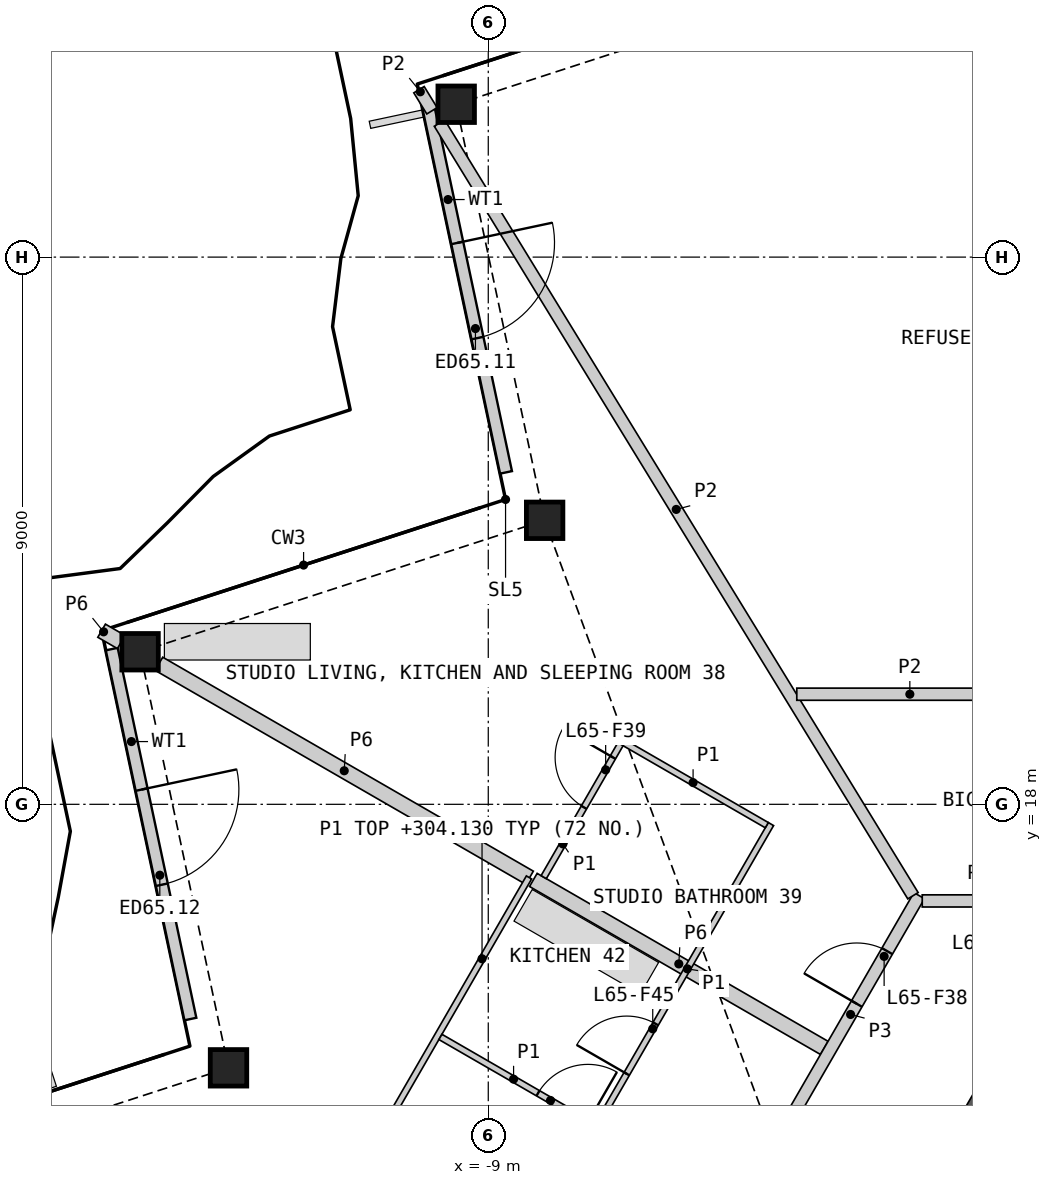
"""IFC4 building model, lengths in metres.
Left out: names, types, materials, properties, quantities, classifications, styles, units other than length and angle.
Written with IfcOpenShell. Run it as: python <this file> out.ifc"""

import sys

from ifc_helpers import new_model, si_unit, direction, frame, frame_2d, origin, origin_2d, place, context, subcontext, project, spatial, rectangle, hollow_rectangle, extrude, element, fill, save


model = new_model("IFC4")
c1 = context("Model", 3, precision=1e-05, world=origin(), true_north=direction((0.0, 1.0)))
c2 = subcontext(c1, "Body", "Model", "MODEL_VIEW")
j1 = project(units=[si_unit("LENGTHUNIT", "METRE"), si_unit("PLANEANGLEUNIT", "RADIAN")], contexts=[c1])
p1 = place(None, origin())
s1 = spatial("IfcSite", under=j1, at=p1, CompositionType="ELEMENT")
p2 = place(p1, origin())
s2 = spatial("IfcBuilding", under=s1, at=p2, CompositionType="ELEMENT")
p3 = place(p2, frame((0.0, 0.0, 301.8)))
s3 = spatial("IfcBuildingStorey", under=s2, at=p3, CompositionType="ELEMENT", Elevation=301.8)
for number, where, z_axis, x_axis in (
    (1, (-9.527, 29.514, 0.0), (0.0, 0.0, 1.0), (1.0, 0.0, 0.0)),
    (2, (-8.073, 22.671, 0.0), (0.0, 0.0, 1.0), (1.0, 0.0, 0.0)),
    (3, (-14.727, 20.509, 0.0), (0.0, 0.0, 1.0), (1.0, 0.0, 0.0)),
    (4, (-13.272, 13.666, 0.0), (0.0, 0.0, 1.0), (1.0, 0.0, 0.0)),
):
    element("IfcColumn", number, at=place(p3, frame(where, z_axis=z_axis, x_axis=x_axis)), inside=s3, PredefinedType="COLUMN", context=c2, shape_type="SweptSolid", body=[
        extrude(hollow_rectangle(XDim=0.6, YDim=0.6, WallThickness=0.04, at=origin_2d()), origin(), (0.0, 0.0, 1.0), 3.4),
    ])
p4 = place(p3, frame((-9.98, 29.443, 0.0), z_axis=(0.0, 0.0, 1.0), x_axis=(0.20793703803, -0.978142212674, 0.0)))
e5 = element("IfcWall", 5, at=p4, inside=s3, PredefinedType="SOLIDWALL", context=c2, shape_type="SweptSolid", body=[
    extrude(rectangle(XDim=6.117, YDim=0.2, at=frame_2d((3.059, 0.0))), origin(), (0.0, 0.0, 1.0), 2.488),
])
p5 = place(p4, frame((2.259, 0.0, 0.0)))
e6 = element("IfcOpeningElement", 6, at=p5, cuts=e5, PredefinedType="OPENING", context=c2, shape_type="SweptSolid", body=[
    extrude(rectangle(XDim=1.6, YDim=2.25, at=frame_2d((0.8, 1.125))), frame((0.0, 0.11, 0.0), z_axis=(0.0, -1.0, 0.0), x_axis=(1.0, 0.0, 0.0)), (0.0, 0.0, 1.0), 0.22),
])
p6 = place(p3, frame((-15.192, 20.553, 0.0), z_axis=(0.0, 0.0, 1.0), x_axis=(0.207920712138, -0.97814568315, 0.0)))
e7 = element("IfcWall", 7, at=p6, inside=s3, PredefinedType="SOLIDWALL", context=c2, shape_type="SweptSolid", body=[
    extrude(rectangle(XDim=6.221, YDim=0.2, at=frame_2d((3.11, 0.0))), origin(), (0.0, 0.0, 1.0), 2.488),
])
p7 = place(p6, frame((2.362, 0.0, 0.0)))
e8 = element("IfcOpeningElement", 8, at=p7, cuts=e7, PredefinedType="OPENING", context=c2, shape_type="SweptSolid", body=[
    extrude(rectangle(XDim=1.6, YDim=2.25, at=frame_2d((0.8, 1.125))), frame((0.0, 0.11, 0.0), z_axis=(0.0, -1.0, 0.0), x_axis=(1.0, 0.0, 0.0)), (0.0, 0.0, 1.0), 0.22),
])
p8 = place(p3, frame((-0.26, 13.961, 0.0), z_axis=(0.0, 0.0, 1.0), x_axis=(-0.499980485389, -0.866036670257, 0.0)))
e9 = element("IfcWall", 9, at=p8, inside=s3, PredefinedType="SHEAR", context=c2, shape_type="SweptSolid", body=[
    extrude(rectangle(XDim=4.559, YDim=0.6, at=frame_2d((2.28, 0.0))), origin(), (0.0, 0.0, 1.0), 3.1),
])
p9 = place(p3, frame((-14.417, 20.311, 0.0), z_axis=(0.0, 0.0, 1.0), x_axis=(0.866027308682, -0.499996700606, 0.0)))
e10 = element("IfcWall", 10, at=p9, inside=s3, PredefinedType="PARTITIONING", context=c2, shape_type="SweptSolid", body=[
    extrude(rectangle(XDim=7.038, YDim=0.25, at=frame_2d((3.519, 0.0))), origin(), (0.0, 0.0, 1.0), 2.33),
])
p10 = place(p3, frame((-8.259, 16.756, 0.0), z_axis=(0.0, 0.0, 1.0), x_axis=(0.866023692682, -0.500002963705, 0.0)))
e11 = element("IfcWall", 11, at=p10, inside=s3, PredefinedType="PARTITIONING", context=c2, shape_type="SweptSolid", body=[
    extrude(rectangle(XDim=5.525, YDim=0.25, at=frame_2d((2.762, 0.0))), origin(), (0.0, 0.0, 1.0), 2.33),
])
p11 = place(p3, frame((-4.169, 12.59, 0.0), z_axis=(0.0, 0.0, 1.0), x_axis=(0.499950370306, 0.866054055606, 0.0)))
e12 = element("IfcWall", 12, at=p11, inside=s3, PredefinedType="PARTITIONING", context=c2, shape_type="SweptSolid", body=[
    extrude(rectangle(XDim=4.513, YDim=0.2, at=frame_2d((2.256, 0.0))), origin(), (0.0, 0.0, 1.0), 3.1),
])
p12 = place(p11, frame((2.459, 0.0, 0.0)))
e13 = element("IfcOpeningElement", 13, at=p12, cuts=e12, PredefinedType="OPENING", context=c2, shape_type="SweptSolid", body=[
    extrude(rectangle(XDim=1.0, YDim=2.1, at=frame_2d((0.5, 1.05))), frame((0.0, 0.11, 0.0), z_axis=(0.0, -1.0, 0.0), x_axis=(1.0, 0.0, 0.0)), (0.0, 0.0, 1.0), 0.22),
])
p13 = place(p3, frame((-1.863, 16.411, 0.0), z_axis=(0.0, 0.0, 1.0), x_axis=(1.0, 0.0, 0.0)))
e14 = element("IfcWall", 14, at=p13, inside=s3, PredefinedType="PARTITIONING", context=c2, shape_type="SweptSolid", body=[
    extrude(rectangle(XDim=3.726, YDim=0.2, at=frame_2d((1.863, 0.0))), origin(), (0.0, 0.0, 1.0), 3.1),
])
p14 = place(p13, frame((1.388, 0.0, 0.0)))
e15 = element("IfcOpeningElement", 15, at=p14, cuts=e14, PredefinedType="OPENING", context=c2, shape_type="SweptSolid", body=[
    extrude(rectangle(XDim=0.95, YDim=2.1, at=frame_2d((0.475, 1.05))), frame((0.0, 0.11, 0.0), z_axis=(0.0, -1.0, 0.0), x_axis=(1.0, 0.0, 0.0)), (0.0, 0.0, 1.0), 0.22),
])
p15 = place(p3, frame((-15.359, 20.855, 0.0), z_axis=(0.0, 0.0, 1.0), x_axis=(0.865770353626, -0.500441499861, 0.0)))
e16 = element("IfcWall", 16, at=p15, inside=s3, PredefinedType="PARTITIONING", context=c2, shape_type="SweptSolid", body=[
    extrude(rectangle(XDim=0.372, YDim=0.25, at=frame_2d((0.186, 0.0))), origin(), (0.0, 0.0, 1.0), 2.33),
])
p16 = place(p3, frame((-9.802, 29.204, 0.0), z_axis=(0.0, 0.0, 1.0), x_axis=(0.522487920222, -0.852646687217, 0.0)))
e17 = element("IfcWall", 17, at=p16, inside=s3, PredefinedType="PARTITIONING", context=c2, shape_type="SweptSolid", body=[
    extrude(rectangle(XDim=14.904, YDim=0.2, at=frame_2d((7.452, 0.0))), origin(), (0.0, 0.0, 1.0), 2.33),
])
p17 = place(p3, frame((-3.926, 19.811, 0.0), z_axis=(0.0, 0.0, 1.0), x_axis=(1.0, 0.0, 0.0)))
e18 = element("IfcWall", 18, at=p17, inside=s3, PredefinedType="PARTITIONING", context=c2, shape_type="SweptSolid", body=[
    extrude(rectangle(XDim=3.718, YDim=0.2, at=frame_2d((1.859, 0.0))), origin(), (0.0, 0.0, 1.0), 2.33),
])
p18 = place(p3, frame((-10.139, 29.754, 0.0), z_axis=(0.0, 0.0, 1.0), x_axis=(0.522224976177, -0.852807759262, 0.0)))
e19 = element("IfcWall", 19, at=p18, inside=s3, PredefinedType="PARTITIONING", context=c2, shape_type="SweptSolid", body=[
    extrude(rectangle(XDim=0.408, YDim=0.2, at=frame_2d((0.204, 0.0))), origin(), (0.0, 0.0, 1.0), 2.33),
])
p19 = place(p3, frame((-16.054, 3.419, 0.0), z_axis=(0.0, 0.0, 1.0), x_axis=(0.499999256795, 0.866025832873, 0.0)))
e20 = element("IfcWall", 20, at=p19, inside=s3, PredefinedType="PARTITIONING", context=c2, shape_type="SweptSolid", body=[
    extrude(rectangle(XDim=15.448, YDim=0.1, at=frame_2d((7.724, 0.0))), origin(), (0.0, 0.0, 1.0), 2.33),
])
p20 = place(p19, frame((8.306, 0.0, 0.0)))
e21 = element("IfcOpeningElement", 21, at=p20, cuts=e20, PredefinedType="OPENING", context=c2, shape_type="SweptSolid", body=[
    extrude(rectangle(XDim=0.95, YDim=2.1, at=frame_2d((0.475, 1.05))), frame((0.0, 0.06, 0.0), z_axis=(0.0, -1.0, 0.0), x_axis=(1.0, 0.0, 0.0)), (0.0, 0.0, 1.0), 0.12),
])
p21 = place(p19, frame((1.76, 0.0, 0.0)))
e22 = element("IfcOpeningElement", 22, at=p21, cuts=e20, PredefinedType="OPENING", context=c2, shape_type="SweptSolid", body=[
    extrude(rectangle(XDim=0.95, YDim=2.1, at=frame_2d((0.475, 1.05))), frame((0.0, 0.06, 0.0), z_axis=(0.0, -1.0, 0.0), x_axis=(1.0, 0.0, 0.0)), (0.0, 0.0, 1.0), 0.12),
])
p22 = place(p3, frame((-9.787, 14.174, 0.0), z_axis=(0.0, 0.0, 1.0), x_axis=(0.866031222068, -0.499989922303, 0.0)))
e23 = element("IfcWall", 23, at=p22, inside=s3, PredefinedType="PARTITIONING", context=c2, shape_type="SweptSolid", body=[
    extrude(rectangle(XDim=5.557, YDim=0.1, at=frame_2d((2.779, 0.0))), origin(), (0.0, 0.0, 1.0), 2.33),
])
p23 = place(p22, frame((1.853, 0.0, 0.0)))
e24 = element("IfcOpeningElement", 24, at=p23, cuts=e23, PredefinedType="OPENING", context=c2, shape_type="SweptSolid", body=[
    extrude(rectangle(XDim=0.95, YDim=2.1, at=frame_2d((0.475, 1.05))), frame((0.0, 0.06, 0.0), z_axis=(0.0, -1.0, 0.0), x_axis=(1.0, 0.0, 0.0)), (0.0, 0.0, 1.0), 0.12),
])
p24 = place(p3, frame((-7.101, 12.912, 0.0), z_axis=(0.0, 0.0, 1.0), x_axis=(0.499996545922, 0.866027397988, 0.0)))
e25 = element("IfcWall", 25, at=p24, inside=s3, PredefinedType="PARTITIONING", context=c2, shape_type="SweptSolid", body=[
    extrude(rectangle(XDim=5.5, YDim=0.1, at=frame_2d((2.75, 0.0))), origin(), (0.0, 0.0, 1.0), 2.33),
])
p25 = place(p24, frame((0.756, 0.0, 0.0)))
e26 = element("IfcOpeningElement", 26, at=p25, cuts=e25, PredefinedType="OPENING", context=c2, shape_type="SweptSolid", body=[
    extrude(rectangle(XDim=0.95, YDim=2.1, at=frame_2d((0.475, 1.05))), frame((0.0, 0.06, 0.0), z_axis=(0.0, -1.0, 0.0), x_axis=(1.0, 0.0, 0.0)), (0.0, 0.0, 1.0), 0.12),
])
p26 = place(p3, frame((-6.844, 19.057, 0.0), z_axis=(0.0, 0.0, 1.0), x_axis=(0.866034573852, -0.49998411664, 0.0)))
e27 = element("IfcWall", 27, at=p26, inside=s3, PredefinedType="PARTITIONING", context=c2, shape_type="SweptSolid", body=[
    extrude(rectangle(XDim=2.8, YDim=0.1, at=frame_2d((1.4, 0.0))), origin(), (0.0, 0.0, 1.0), 2.33),
])
p27 = place(p3, frame((-8.088, 16.802, 0.0), z_axis=(0.0, 0.0, 1.0), x_axis=(0.499976333282, 0.866039067339, 0.0)))
e28 = element("IfcWall", 28, at=p27, inside=s3, PredefinedType="PARTITIONING", context=c2, shape_type="SweptSolid", body=[
    extrude(rectangle(XDim=2.525, YDim=0.1, at=frame_2d((1.262, 0.0))), origin(), (0.0, 0.0, 1.0), 2.33),
])
p28 = place(p27, frame((1.325, 0.0, 0.0)))
e29 = element("IfcOpeningElement", 29, at=p28, cuts=e28, PredefinedType="OPENING", context=c2, shape_type="SweptSolid", body=[
    extrude(rectangle(XDim=0.95, YDim=2.1, at=frame_2d((0.475, 1.05))), frame((0.0, 0.06, 0.0), z_axis=(0.0, -1.0, 0.0), x_axis=(1.0, 0.0, 0.0)), (0.0, 0.0, 1.0), 0.12),
])
p29 = place(p5, origin())
e30 = element("IfcDoor", 30, at=p29, inside=s3, OperationType="DOUBLE_DOOR_SINGLE_SWING", PredefinedType="DOOR", context=c2, shape_type="SweptSolid", body=[
    extrude(rectangle(XDim=1.6, YDim=2.25, at=frame_2d((0.8, 1.125))), frame((0.0, 0.025, 0.0), z_axis=(0.0, -1.0, 0.0), x_axis=(1.0, 0.0, 0.0)), (0.0, 0.0, 1.0), 0.05),
])
fill(e6, e30)
p30 = place(p7, origin())
e31 = element("IfcDoor", 31, at=p30, inside=s3, OperationType="DOUBLE_DOOR_SINGLE_SWING", PredefinedType="DOOR", context=c2, shape_type="SweptSolid", body=[
    extrude(rectangle(XDim=1.6, YDim=2.25, at=frame_2d((0.8, 1.125))), frame((0.0, 0.025, 0.0), z_axis=(0.0, -1.0, 0.0), x_axis=(1.0, 0.0, 0.0)), (0.0, 0.0, 1.0), 0.05),
])
fill(e8, e31)
p31 = place(p12, origin())
e32 = element("IfcDoor", 32, at=p31, inside=s3, OperationType="SINGLE_SWING_LEFT", PredefinedType="DOOR", context=c2, shape_type="SweptSolid", body=[
    extrude(rectangle(XDim=1.0, YDim=2.1, at=frame_2d((0.5, 1.05))), frame((0.0, 0.025, 0.0), z_axis=(0.0, -1.0, 0.0), x_axis=(1.0, 0.0, 0.0)), (0.0, 0.0, 1.0), 0.05),
])
fill(e13, e32)
p32 = place(p28, origin())
e33 = element("IfcDoor", 33, at=p32, inside=s3, OperationType="SINGLE_SWING_RIGHT", PredefinedType="DOOR", context=c2, shape_type="SweptSolid", body=[
    extrude(rectangle(XDim=0.95, YDim=2.1, at=frame_2d((0.475, 1.05))), frame((0.0, 0.025, 0.0), z_axis=(0.0, -1.0, 0.0), x_axis=(1.0, 0.0, 0.0)), (0.0, 0.0, 1.0), 0.05),
])
fill(e29, e33)
p33 = place(p23, origin())
e34 = element("IfcDoor", 34, at=p33, inside=s3, OperationType="SINGLE_SWING_RIGHT", PredefinedType="DOOR", context=c2, shape_type="SweptSolid", body=[
    extrude(rectangle(XDim=0.95, YDim=2.1, at=frame_2d((0.475, 1.05))), frame((0.0, 0.025, 0.0), z_axis=(0.0, -1.0, 0.0), x_axis=(1.0, 0.0, 0.0)), (0.0, 0.0, 1.0), 0.05),
])
fill(e24, e34)
p34 = place(p25, origin())
e35 = element("IfcDoor", 35, at=p34, inside=s3, OperationType="SINGLE_SWING_LEFT", PredefinedType="DOOR", context=c2, shape_type="SweptSolid", body=[
    extrude(rectangle(XDim=0.95, YDim=2.1, at=frame_2d((0.475, 1.05))), frame((0.0, 0.025, 0.0), z_axis=(0.0, -1.0, 0.0), x_axis=(1.0, 0.0, 0.0)), (0.0, 0.0, 1.0), 0.05),
])
fill(e26, e35)
save(model, sys.argv[1])
